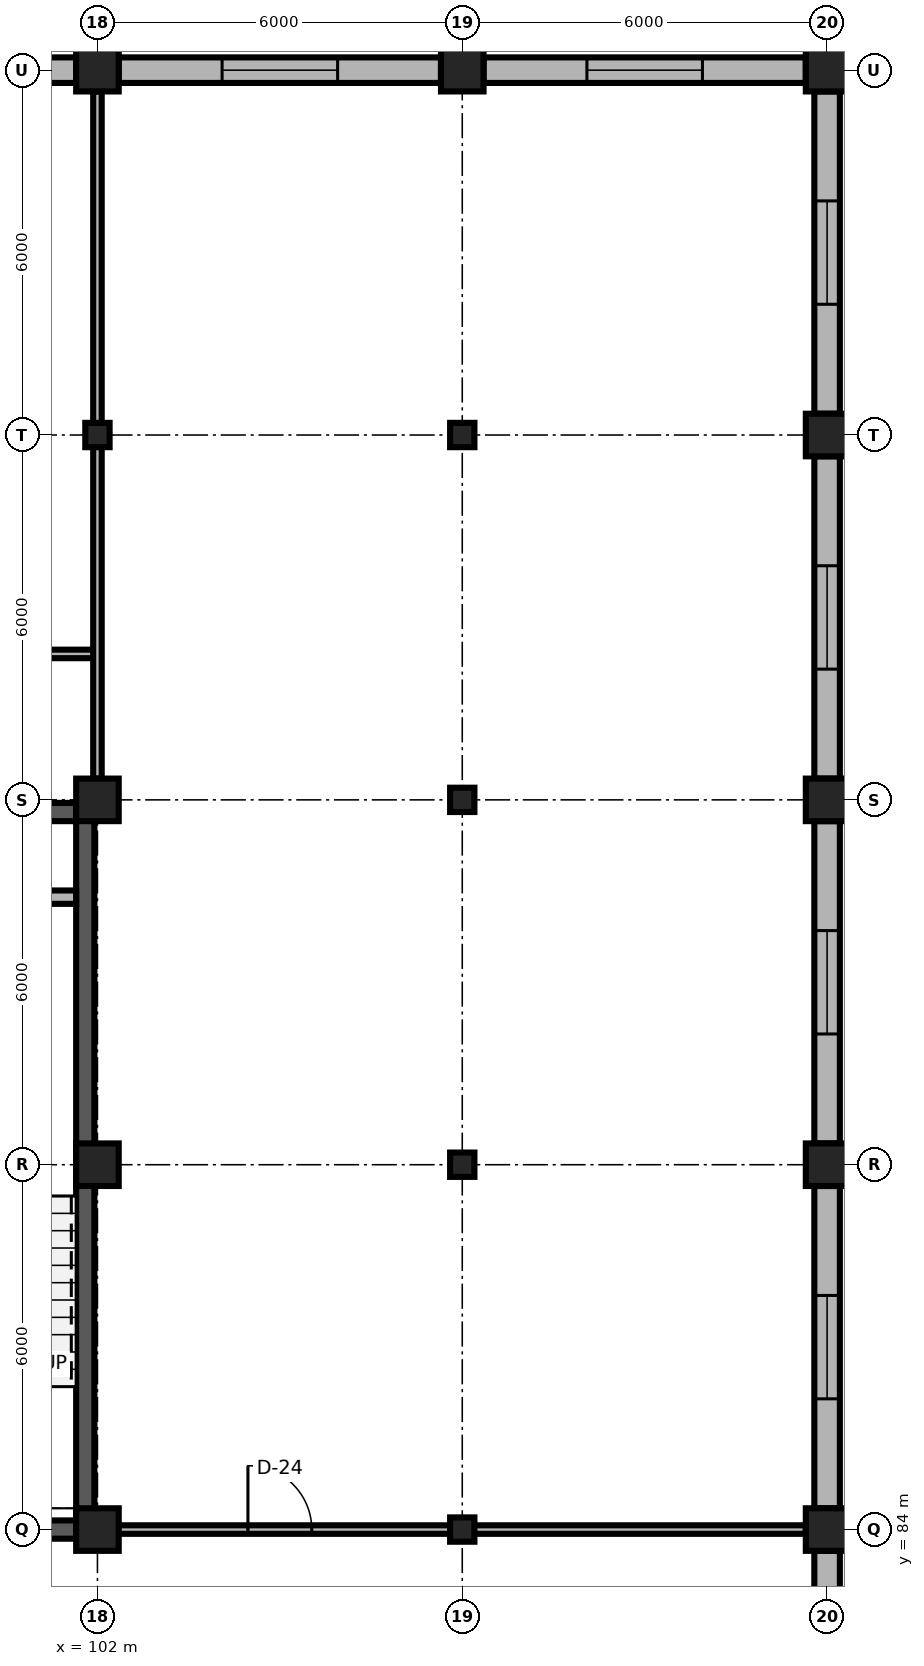
"""IFC4 building model, lengths in metres.
Left out: names, types, materials, properties, quantities, classifications, styles, units other than length and angle.
Written with IfcOpenShell. Run it as: python <this file> out.ifc"""

import sys

from ifc_helpers import new_model, si_unit, direction, frame, frame_2d, origin, origin_2d, place, context, subcontext, project, spatial, rectangle, i_section, extrude, element, fill, save


model = new_model("IFC4")
c1 = context("Model", 3, precision=1e-05, world=origin(), true_north=direction((0.0, 1.0)))
c2 = subcontext(c1, "Body", "Model", "MODEL_VIEW")
j1 = project(units=[si_unit("LENGTHUNIT", "METRE"), si_unit("PLANEANGLEUNIT", "RADIAN")], contexts=[c1])
p1 = place(None, origin())
s1 = spatial("IfcSite", under=j1, at=p1, CompositionType="ELEMENT")
p2 = place(p1, origin())
s2 = spatial("IfcBuilding", under=s1, at=p2, CompositionType="ELEMENT")
p3 = place(p2, frame((0.0, 0.0, 24.9)))
s3 = spatial("IfcBuildingStorey", under=s2, at=p3, CompositionType="ELEMENT", Elevation=24.9)
p4 = place(p3, frame((102.0, 84.0, 0.0), z_axis=(0.0, 0.0, 1.0), x_axis=(1.0, 0.0, 0.0)))
e1 = element("IfcColumn", 1, at=p4, inside=s3, PredefinedType="COLUMN", context=c2, shape_type="SweptSolid", body=[
    extrude(rectangle(XDim=0.7, YDim=0.7, at=origin_2d()), origin(), (0.0, 0.0, 1.0), 3.9),
])
p5 = place(p3, frame((108.0, 84.0, 0.0), z_axis=(0.0, 0.0, 1.0), x_axis=(1.0, 0.0, 0.0)))
e2 = element("IfcColumn", 2, at=p5, inside=s3, PredefinedType="COLUMN", context=c2, shape_type="SweptSolid", body=[
    extrude(i_section(OverallWidth=0.4, OverallDepth=0.4, WebThickness=0.013, FlangeThickness=0.021, FilletRadius=0.022, at=origin_2d()), origin(), (0.0, 0.0, 1.0), 3.9),
])
for number, where, z_axis, x_axis in (
    (3, (114.0, 84.0, 0.0), (0.0, 0.0, 1.0), (1.0, 0.0, 0.0)),
    (4, (102.0, 90.0, 0.0), (0.0, 0.0, 1.0), (1.0, 0.0, 0.0)),
):
    element("IfcColumn", number, at=place(p3, frame(where, z_axis=z_axis, x_axis=x_axis)), inside=s3, PredefinedType="COLUMN", context=c2, shape_type="SweptSolid", body=[
        extrude(rectangle(XDim=0.7, YDim=0.7, at=origin_2d()), origin(), (0.0, 0.0, 1.0), 3.9),
    ])
p6 = place(p3, frame((108.0, 90.0, 0.0), z_axis=(0.0, 0.0, 1.0), x_axis=(1.0, 0.0, 0.0)))
e5 = element("IfcColumn", 5, at=p6, inside=s3, PredefinedType="COLUMN", context=c2, shape_type="SweptSolid", body=[
    extrude(i_section(OverallWidth=0.4, OverallDepth=0.4, WebThickness=0.013, FlangeThickness=0.021, FilletRadius=0.022, at=origin_2d()), origin(), (0.0, 0.0, 1.0), 3.9),
])
for number, where, z_axis, x_axis in (
    (6, (114.0, 90.0, 0.0), (0.0, 0.0, 1.0), (1.0, 0.0, 0.0)),
    (7, (102.0, 96.0, 0.0), (0.0, 0.0, 1.0), (1.0, 0.0, 0.0)),
):
    element("IfcColumn", number, at=place(p3, frame(where, z_axis=z_axis, x_axis=x_axis)), inside=s3, PredefinedType="COLUMN", context=c2, shape_type="SweptSolid", body=[
        extrude(rectangle(XDim=0.7, YDim=0.7, at=origin_2d()), origin(), (0.0, 0.0, 1.0), 3.9),
    ])
p7 = place(p3, frame((108.0, 96.0, 0.0), z_axis=(0.0, 0.0, 1.0), x_axis=(1.0, 0.0, 0.0)))
e8 = element("IfcColumn", 8, at=p7, inside=s3, PredefinedType="COLUMN", context=c2, shape_type="SweptSolid", body=[
    extrude(i_section(OverallWidth=0.4, OverallDepth=0.4, WebThickness=0.013, FlangeThickness=0.021, FilletRadius=0.022, at=origin_2d()), origin(), (0.0, 0.0, 1.0), 3.9),
])
p8 = place(p3, frame((114.0, 96.0, 0.0), z_axis=(0.0, 0.0, 1.0), x_axis=(1.0, 0.0, 0.0)))
e9 = element("IfcColumn", 9, at=p8, inside=s3, PredefinedType="COLUMN", context=c2, shape_type="SweptSolid", body=[
    extrude(rectangle(XDim=0.7, YDim=0.7, at=origin_2d()), origin(), (0.0, 0.0, 1.0), 3.9),
])
for number, where, z_axis, x_axis in (
    (10, (102.0, 102.0, 0.0), (0.0, 0.0, 1.0), (1.0, 0.0, 0.0)),
    (11, (108.0, 102.0, 0.0), (0.0, 0.0, 1.0), (1.0, 0.0, 0.0)),
):
    element("IfcColumn", number, at=place(p3, frame(where, z_axis=z_axis, x_axis=x_axis)), inside=s3, PredefinedType="COLUMN", context=c2, shape_type="SweptSolid", body=[
        extrude(i_section(OverallWidth=0.4, OverallDepth=0.4, WebThickness=0.013, FlangeThickness=0.021, FilletRadius=0.022, at=origin_2d()), origin(), (0.0, 0.0, 1.0), 3.9),
    ])
for number, where, z_axis, x_axis in (
    (12, (114.0, 102.0, 0.0), (0.0, 0.0, 1.0), (1.0, 0.0, 0.0)),
    (13, (102.0, 108.0, 0.0), (0.0, 0.0, 1.0), (1.0, 0.0, 0.0)),
    (14, (108.0, 108.0, 0.0), (0.0, 0.0, 1.0), (1.0, 0.0, 0.0)),
    (15, (114.0, 108.0, 0.0), (0.0, 0.0, 1.0), (1.0, 0.0, 0.0)),
):
    element("IfcColumn", number, at=place(p3, frame(where, z_axis=z_axis, x_axis=x_axis)), inside=s3, PredefinedType="COLUMN", context=c2, shape_type="SweptSolid", body=[
        extrude(rectangle(XDim=0.7, YDim=0.7, at=origin_2d()), origin(), (0.0, 0.0, 1.0), 3.9),
    ])
p9 = place(p3, frame((96.35, 108.0, 0.0), z_axis=(0.0, 0.0, 1.0), x_axis=(1.0, 0.0, 0.0)))
e16 = element("IfcWall", 16, at=p9, inside=s3, PredefinedType="SOLIDWALL", context=c2, shape_type="SweptSolid", body=[
    extrude(rectangle(XDim=5.3, YDim=0.42, at=frame_2d((2.65, 0.0))), origin(), (0.0, 0.0, 1.0), 3.32),
])
p10 = place(p9, frame((1.7, 0.0, 0.85)))
e17 = element("IfcOpeningElement", 17, at=p10, cuts=e16, PredefinedType="OPENING", context=c2, shape_type="SweptSolid", body=[
    extrude(rectangle(XDim=1.9, YDim=2.1, at=frame_2d((0.95, 1.05))), frame((0.0, 0.225, 0.0), z_axis=(0.0, -1.0, 0.0), x_axis=(1.0, 0.0, 0.0)), (0.0, 0.0, 1.0), 0.45),
])
p11 = place(p3, frame((102.35, 108.0, 0.0), z_axis=(0.0, 0.0, 1.0), x_axis=(1.0, 0.0, 0.0)))
e18 = element("IfcWall", 18, at=p11, inside=s3, PredefinedType="SOLIDWALL", context=c2, shape_type="SweptSolid", body=[
    extrude(rectangle(XDim=5.3, YDim=0.42, at=frame_2d((2.65, 0.0))), origin(), (0.0, 0.0, 1.0), 3.32),
])
p12 = place(p11, frame((1.7, 0.0, 0.85)))
e19 = element("IfcOpeningElement", 19, at=p12, cuts=e18, PredefinedType="OPENING", context=c2, shape_type="SweptSolid", body=[
    extrude(rectangle(XDim=1.9, YDim=2.1, at=frame_2d((0.95, 1.05))), frame((0.0, 0.225, 0.0), z_axis=(0.0, -1.0, 0.0), x_axis=(1.0, 0.0, 0.0)), (0.0, 0.0, 1.0), 0.45),
])
p13 = place(p3, frame((108.35, 108.0, 0.0), z_axis=(0.0, 0.0, 1.0), x_axis=(1.0, 0.0, 0.0)))
e20 = element("IfcWall", 20, at=p13, inside=s3, PredefinedType="SOLIDWALL", context=c2, shape_type="SweptSolid", body=[
    extrude(rectangle(XDim=5.3, YDim=0.42, at=frame_2d((2.65, 0.0))), origin(), (0.0, 0.0, 1.0), 3.32),
])
p14 = place(p13, frame((1.7, 0.0, 0.85)))
e21 = element("IfcOpeningElement", 21, at=p14, cuts=e20, PredefinedType="OPENING", context=c2, shape_type="SweptSolid", body=[
    extrude(rectangle(XDim=1.9, YDim=2.1, at=frame_2d((0.95, 1.05))), frame((0.0, 0.225, 0.0), z_axis=(0.0, -1.0, 0.0), x_axis=(1.0, 0.0, 0.0)), (0.0, 0.0, 1.0), 0.45),
])
p15 = place(p3, frame((114.0, 78.35, 0.0), z_axis=(0.0, 0.0, 1.0), x_axis=(0.0, 1.0, 0.0)))
e22 = element("IfcWall", 22, at=p15, inside=s3, PredefinedType="SOLIDWALL", context=c2, shape_type="SweptSolid", body=[
    extrude(rectangle(XDim=5.3, YDim=0.42, at=frame_2d((2.65, 0.0))), origin(), (0.0, 0.0, 1.0), 3.32),
])
p16 = place(p15, frame((1.8, 0.0, 0.85)))
e23 = element("IfcOpeningElement", 23, at=p16, cuts=e22, PredefinedType="OPENING", context=c2, shape_type="SweptSolid", body=[
    extrude(rectangle(XDim=1.7, YDim=2.05, at=frame_2d((0.85, 1.025))), frame((0.0, 0.225, 0.0), z_axis=(0.0, -1.0, 0.0), x_axis=(1.0, 0.0, 0.0)), (0.0, 0.0, 1.0), 0.45),
])
p17 = place(p3, frame((114.0, 84.35, 0.0), z_axis=(0.0, 0.0, 1.0), x_axis=(0.0, 1.0, 0.0)))
e24 = element("IfcWall", 24, at=p17, inside=s3, PredefinedType="SOLIDWALL", context=c2, shape_type="SweptSolid", body=[
    extrude(rectangle(XDim=5.3, YDim=0.42, at=frame_2d((2.65, 0.0))), origin(), (0.0, 0.0, 1.0), 3.32),
])
p18 = place(p17, frame((1.8, 0.0, 0.85)))
e25 = element("IfcOpeningElement", 25, at=p18, cuts=e24, PredefinedType="OPENING", context=c2, shape_type="SweptSolid", body=[
    extrude(rectangle(XDim=1.7, YDim=2.05, at=frame_2d((0.85, 1.025))), frame((0.0, 0.225, 0.0), z_axis=(0.0, -1.0, 0.0), x_axis=(1.0, 0.0, 0.0)), (0.0, 0.0, 1.0), 0.45),
])
p19 = place(p3, frame((114.0, 90.35, 0.0), z_axis=(0.0, 0.0, 1.0), x_axis=(0.0, 1.0, 0.0)))
e26 = element("IfcWall", 26, at=p19, inside=s3, PredefinedType="SOLIDWALL", context=c2, shape_type="SweptSolid", body=[
    extrude(rectangle(XDim=5.3, YDim=0.42, at=frame_2d((2.65, 0.0))), origin(), (0.0, 0.0, 1.0), 3.32),
])
p20 = place(p19, frame((1.8, 0.0, 0.85)))
e27 = element("IfcOpeningElement", 27, at=p20, cuts=e26, PredefinedType="OPENING", context=c2, shape_type="SweptSolid", body=[
    extrude(rectangle(XDim=1.7, YDim=2.05, at=frame_2d((0.85, 1.025))), frame((0.0, 0.225, 0.0), z_axis=(0.0, -1.0, 0.0), x_axis=(1.0, 0.0, 0.0)), (0.0, 0.0, 1.0), 0.45),
])
p21 = place(p3, frame((114.0, 96.35, 0.0), z_axis=(0.0, 0.0, 1.0), x_axis=(0.0, 1.0, 0.0)))
e28 = element("IfcWall", 28, at=p21, inside=s3, PredefinedType="SOLIDWALL", context=c2, shape_type="SweptSolid", body=[
    extrude(rectangle(XDim=5.3, YDim=0.42, at=frame_2d((2.65, 0.0))), origin(), (0.0, 0.0, 1.0), 3.32),
])
p22 = place(p21, frame((1.8, 0.0, 0.85)))
e29 = element("IfcOpeningElement", 29, at=p22, cuts=e28, PredefinedType="OPENING", context=c2, shape_type="SweptSolid", body=[
    extrude(rectangle(XDim=1.7, YDim=2.05, at=frame_2d((0.85, 1.025))), frame((0.0, 0.225, 0.0), z_axis=(0.0, -1.0, 0.0), x_axis=(1.0, 0.0, 0.0)), (0.0, 0.0, 1.0), 0.45),
])
p23 = place(p3, frame((114.0, 102.35, 0.0), z_axis=(0.0, 0.0, 1.0), x_axis=(0.0, 1.0, 0.0)))
e30 = element("IfcWall", 30, at=p23, inside=s3, PredefinedType="SOLIDWALL", context=c2, shape_type="SweptSolid", body=[
    extrude(rectangle(XDim=5.3, YDim=0.42, at=frame_2d((2.65, 0.0))), origin(), (0.0, 0.0, 1.0), 3.32),
])
p24 = place(p23, frame((1.8, 0.0, 0.85)))
e31 = element("IfcOpeningElement", 31, at=p24, cuts=e30, PredefinedType="OPENING", context=c2, shape_type="SweptSolid", body=[
    extrude(rectangle(XDim=1.7, YDim=2.05, at=frame_2d((0.85, 1.025))), frame((0.0, 0.225, 0.0), z_axis=(0.0, -1.0, 0.0), x_axis=(1.0, 0.0, 0.0)), (0.0, 0.0, 1.0), 0.45),
])
p25 = place(p3, frame((96.35, 84.0, 0.0), z_axis=(0.0, 0.0, 1.0), x_axis=(1.0, 0.0, 0.0)))
e32 = element("IfcWall", 32, at=p25, inside=s3, PredefinedType="SHEAR", context=c2, shape_type="SweptSolid", body=[
    extrude(rectangle(XDim=5.3, YDim=0.3, at=frame_2d((2.65, 0.0))), origin(), (0.0, 0.0, 1.0), 3.66),
])
p26 = place(p25, frame((1.975, 0.0, 0.0)))
e33 = element("IfcOpeningElement", 33, at=p26, cuts=e32, PredefinedType="OPENING", context=c2, shape_type="SweptSolid", body=[
    extrude(rectangle(XDim=1.35, YDim=2.2, at=frame_2d((0.675, 1.1))), frame((0.0, 0.165, 0.0), z_axis=(0.0, -1.0, 0.0), x_axis=(1.0, 0.0, 0.0)), (0.0, 0.0, 1.0), 0.33),
])
p27 = place(p3, frame((96.35, 95.8, 0.0), z_axis=(0.0, 0.0, 1.0), x_axis=(1.0, 0.0, 0.0)))
e34 = element("IfcWall", 34, at=p27, inside=s3, PredefinedType="SHEAR", context=c2, shape_type="SweptSolid", body=[
    extrude(rectangle(XDim=5.3, YDim=0.3, at=frame_2d((2.65, 0.0))), origin(), (0.0, 0.0, 1.0), 3.74),
])
p28 = place(p3, frame((101.8, 84.0, 0.0), z_axis=(0.0, 0.0, 1.0), x_axis=(0.0, 1.0, 0.0)))
e35 = element("IfcWall", 35, at=p28, inside=s3, PredefinedType="SHEAR", context=c2, shape_type="SweptSolid", body=[
    extrude(rectangle(XDim=11.8, YDim=0.3, at=frame_2d((5.9, 0.0))), origin(), (0.0, 0.0, 1.0), 3.74),
])
p29 = place(p3, frame((100.55, 94.4, 0.0), z_axis=(0.0, 0.0, 1.0), x_axis=(1.0, 0.0, 0.0)))
e36 = element("IfcWall", 36, at=p29, inside=s3, PredefinedType="PARTITIONING", context=c2, shape_type="SweptSolid", body=[
    extrude(rectangle(XDim=1.1, YDim=0.22, at=frame_2d((0.55, 0.0))), origin(), (0.0, 0.0, 1.0), 3.74),
])
p30 = place(p3, frame((96.0, 98.4, 0.0), z_axis=(0.0, 0.0, 1.0), x_axis=(1.0, 0.0, 0.0)))
e37 = element("IfcWall", 37, at=p30, inside=s3, PredefinedType="PARTITIONING", context=c2, shape_type="SweptSolid", body=[
    extrude(rectangle(XDim=6.0, YDim=0.14, at=frame_2d((3.0, 0.0))), origin(), (0.0, 0.0, 1.0), 3.74),
])
p31 = place(p30, frame((2.54, 0.0, 0.0)))
e38 = element("IfcOpeningElement", 38, at=p31, cuts=e37, PredefinedType="OPENING", context=c2, shape_type="SweptSolid", body=[
    extrude(rectangle(XDim=0.92, YDim=2.15, at=frame_2d((0.46, 1.075))), frame((0.0, 0.085, 0.0), z_axis=(0.0, -1.0, 0.0), x_axis=(1.0, 0.0, 0.0)), (0.0, 0.0, 1.0), 0.17),
])
p32 = place(p3, frame((102.0, 84.0, 0.0), z_axis=(0.0, 0.0, 1.0), x_axis=(1.0, 0.0, 0.0)))
e39 = element("IfcWall", 39, at=p32, inside=s3, PredefinedType="PARTITIONING", context=c2, shape_type="SweptSolid", body=[
    extrude(rectangle(XDim=6.0, YDim=0.14, at=frame_2d((3.0, 0.0))), origin(), (0.0, 0.0, 1.0), 3.352),
])
p33 = place(p32, frame((2.475, 0.0, 0.0)))
e40 = element("IfcOpeningElement", 40, at=p33, cuts=e39, PredefinedType="OPENING", context=c2, shape_type="SweptSolid", body=[
    extrude(rectangle(XDim=1.05, YDim=2.25, at=frame_2d((0.525, 1.125))), frame((0.0, 0.085, 0.0), z_axis=(0.0, -1.0, 0.0), x_axis=(1.0, 0.0, 0.0)), (0.0, 0.0, 1.0), 0.17),
])
p34 = place(p3, frame((102.0, 96.35, 0.0), z_axis=(0.0, 0.0, 1.0), x_axis=(0.0, 1.0, 0.0)))
e41 = element("IfcWall", 41, at=p34, inside=s3, PredefinedType="PARTITIONING", context=c2, shape_type="SweptSolid", body=[
    extrude(rectangle(XDim=11.3, YDim=0.14, at=frame_2d((5.65, 0.0))), origin(), (0.0, 0.0, 1.0), 3.352),
])
p35 = place(p3, frame((108.0, 84.0, 0.0), z_axis=(0.0, 0.0, 1.0), x_axis=(1.0, 0.0, 0.0)))
e42 = element("IfcWall", 42, at=p35, inside=s3, PredefinedType="PARTITIONING", context=c2, shape_type="SweptSolid", body=[
    extrude(rectangle(XDim=5.65, YDim=0.14, at=frame_2d((2.825, 0.0))), origin(), (0.0, 0.0, 1.0), 3.352),
])
p36 = place(p12, origin())
e43 = element("IfcWindow", 43, at=p36, inside=s3, PartitioningType="SINGLE_PANEL", PredefinedType="WINDOW", context=c2, shape_type="SweptSolid", body=[
    extrude(rectangle(XDim=1.9, YDim=2.1, at=frame_2d((0.95, 1.05))), frame((0.0, 0.03, 0.0), z_axis=(0.0, -1.0, 0.0), x_axis=(1.0, 0.0, 0.0)), (0.0, 0.0, 1.0), 0.06),
])
fill(e19, e43)
p37 = place(p14, origin())
e44 = element("IfcWindow", 44, at=p37, inside=s3, PartitioningType="SINGLE_PANEL", PredefinedType="WINDOW", context=c2, shape_type="SweptSolid", body=[
    extrude(rectangle(XDim=1.9, YDim=2.1, at=frame_2d((0.95, 1.05))), frame((0.0, 0.03, 0.0), z_axis=(0.0, -1.0, 0.0), x_axis=(1.0, 0.0, 0.0)), (0.0, 0.0, 1.0), 0.06),
])
fill(e21, e44)
p38 = place(p18, origin())
e45 = element("IfcWindow", 45, at=p38, inside=s3, PartitioningType="SINGLE_PANEL", PredefinedType="WINDOW", context=c2, shape_type="SweptSolid", body=[
    extrude(rectangle(XDim=1.7, YDim=2.05, at=frame_2d((0.85, 1.025))), frame((0.0, 0.03, 0.0), z_axis=(0.0, -1.0, 0.0), x_axis=(1.0, 0.0, 0.0)), (0.0, 0.0, 1.0), 0.06),
])
fill(e25, e45)
p39 = place(p20, origin())
e46 = element("IfcWindow", 46, at=p39, inside=s3, PartitioningType="SINGLE_PANEL", PredefinedType="WINDOW", context=c2, shape_type="SweptSolid", body=[
    extrude(rectangle(XDim=1.7, YDim=2.05, at=frame_2d((0.85, 1.025))), frame((0.0, 0.03, 0.0), z_axis=(0.0, -1.0, 0.0), x_axis=(1.0, 0.0, 0.0)), (0.0, 0.0, 1.0), 0.06),
])
fill(e27, e46)
p40 = place(p22, origin())
e47 = element("IfcWindow", 47, at=p40, inside=s3, PartitioningType="SINGLE_PANEL", PredefinedType="WINDOW", context=c2, shape_type="SweptSolid", body=[
    extrude(rectangle(XDim=1.7, YDim=2.05, at=frame_2d((0.85, 1.025))), frame((0.0, 0.03, 0.0), z_axis=(0.0, -1.0, 0.0), x_axis=(1.0, 0.0, 0.0)), (0.0, 0.0, 1.0), 0.06),
])
fill(e29, e47)
p41 = place(p24, origin())
e48 = element("IfcWindow", 48, at=p41, inside=s3, PartitioningType="SINGLE_PANEL", PredefinedType="WINDOW", context=c2, shape_type="SweptSolid", body=[
    extrude(rectangle(XDim=1.7, YDim=2.05, at=frame_2d((0.85, 1.025))), frame((0.0, 0.03, 0.0), z_axis=(0.0, -1.0, 0.0), x_axis=(1.0, 0.0, 0.0)), (0.0, 0.0, 1.0), 0.06),
])
fill(e31, e48)
p42 = place(p33, origin())
e49 = element("IfcDoor", 49, at=p42, inside=s3, OperationType="SINGLE_SWING_LEFT", PredefinedType="DOOR", context=c2, shape_type="SweptSolid", body=[
    extrude(rectangle(XDim=1.05, YDim=2.25, at=frame_2d((0.525, 1.125))), frame((0.0, 0.025, 0.0), z_axis=(0.0, -1.0, 0.0), x_axis=(1.0, 0.0, 0.0)), (0.0, 0.0, 1.0), 0.05),
])
fill(e40, e49)
save(model, sys.argv[1])
